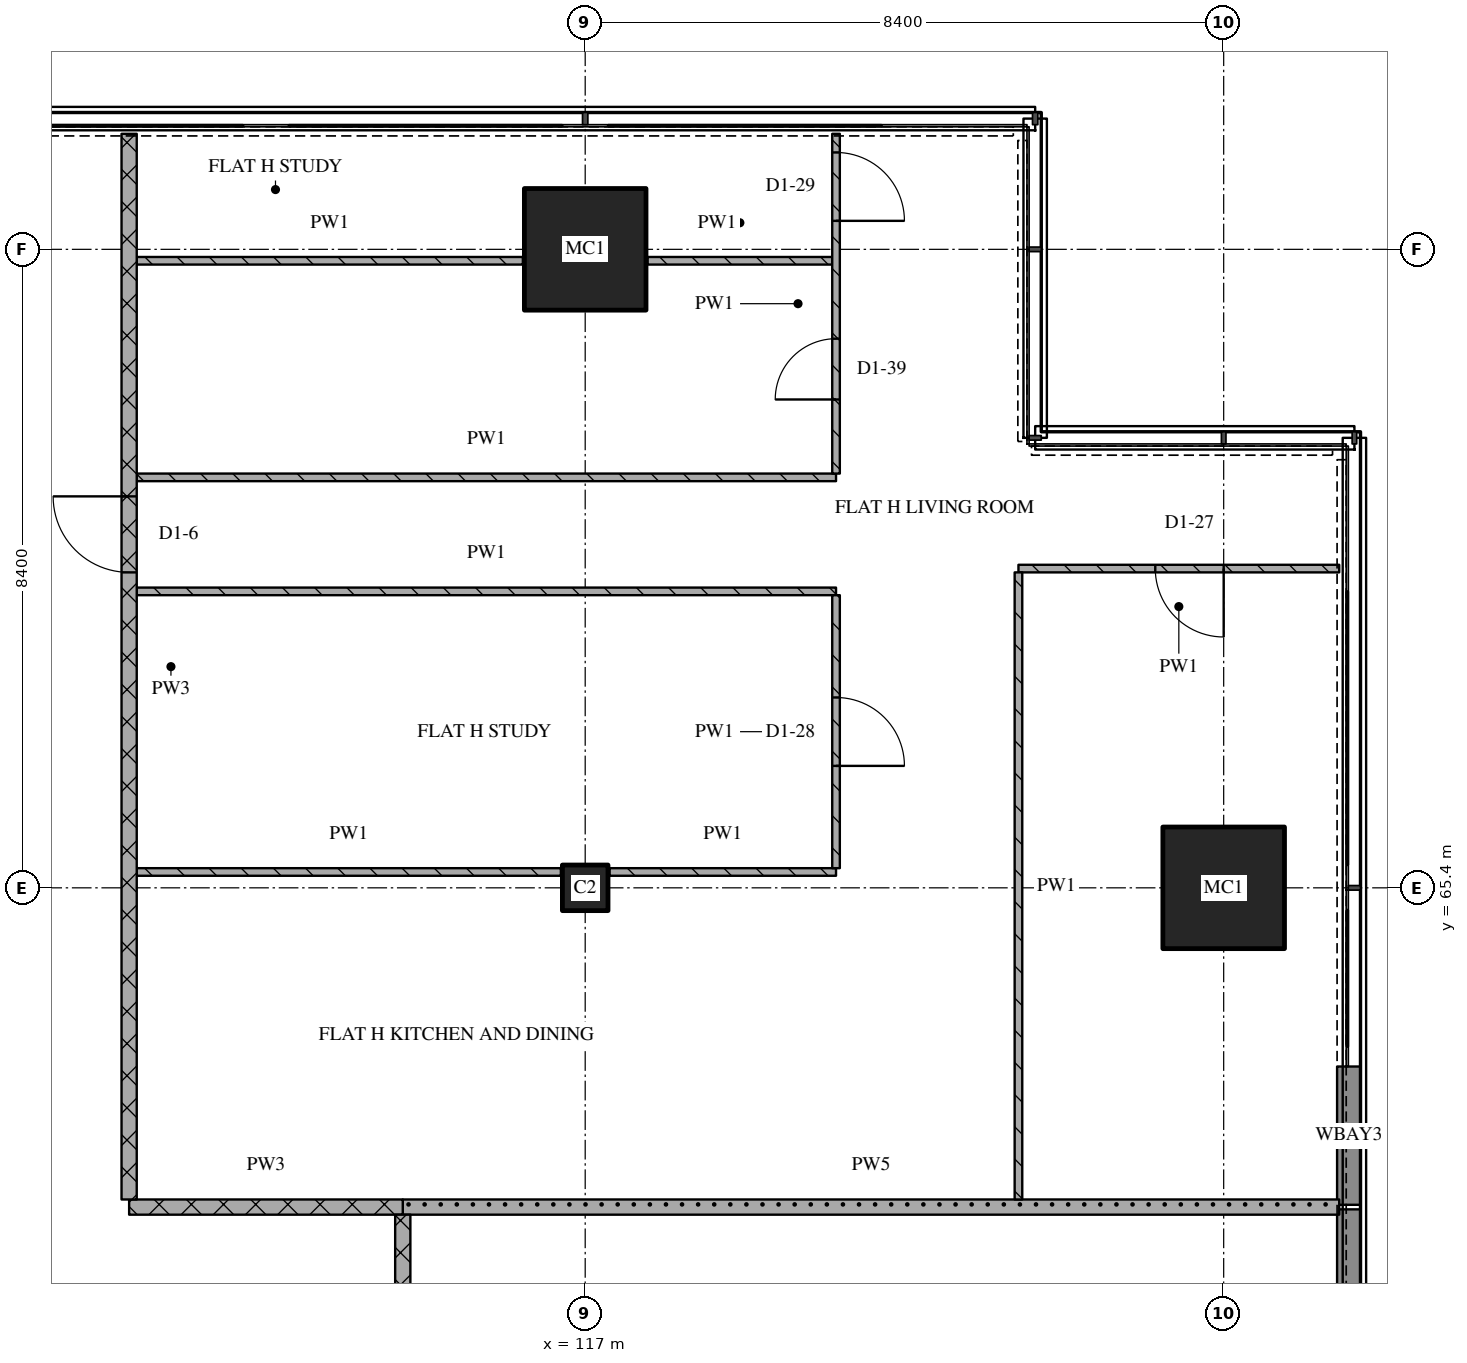
"""IFC4 building model, lengths in metres.
Left out: names, types, materials, properties, quantities, classifications, styles, units other than length and angle.
Written with IfcOpenShell. Run it as: python <this file> out.ifc"""

import sys

from ifc_helpers import new_model, si_unit, direction, frame, frame_2d, origin, origin_2d, place, context, subcontext, project, spatial, rectangle, extrude, element, fill, save


model = new_model("IFC4")
c1 = context("Model", 3, precision=1e-05, world=origin(), true_north=direction((0.0, 1.0)))
c2 = subcontext(c1, "Body", "Model", "MODEL_VIEW")
j1 = project(units=[si_unit("LENGTHUNIT", "METRE"), si_unit("PLANEANGLEUNIT", "RADIAN")], contexts=[c1])
p1 = place(None, origin())
s1 = spatial("IfcSite", under=j1, at=p1, CompositionType="ELEMENT")
p2 = place(p1, origin())
s2 = spatial("IfcBuilding", under=s1, at=p2, CompositionType="ELEMENT")
p3 = place(p2, frame((0.0, 0.0, 205.5)))
s3 = spatial("IfcBuildingStorey", under=s2, at=p3, CompositionType="ELEMENT", Elevation=205.5)
p4 = place(p3, frame((117.0, 65.4, 0.0), z_axis=(0.0, 0.0, 1.0), x_axis=(1.0, 0.0, 0.0)))
e1 = element("IfcColumn", 1, at=p4, inside=s3, PredefinedType="COLUMN", context=c2, shape_type="SweptSolid", body=[
    extrude(rectangle(XDim=0.6, YDim=0.6, at=origin_2d()), origin(), (0.0, 0.0, 1.0), 3.6),
])
for number, where, z_axis, x_axis in (
    (2, (117.0, 73.8, 0.0), (0.0, 0.0, 1.0), (1.0, 0.0, 0.0)),
    (3, (125.4, 65.4, 0.0), (0.0, 0.0, 1.0), (1.0, 0.0, 0.0)),
):
    element("IfcColumn", number, at=place(p3, frame(where, z_axis=z_axis, x_axis=x_axis)), inside=s3, PredefinedType="COLUMN", context=c2, shape_type="SweptSolid", body=[
        extrude(rectangle(XDim=1.6, YDim=1.6, at=origin_2d()), origin(), (0.0, 0.0, 1.0), 3.6),
    ])
p5 = place(p3, frame((127.046, 61.17, 0.0), z_axis=(0.0, 0.0, 1.0), x_axis=(0.0, -1.0, 0.0)))
e4 = element("IfcWall", 4, at=p5, inside=s3, PredefinedType="SOLIDWALL", context=c2, shape_type="SweptSolid", body=[
    extrude(rectangle(XDim=4.14, YDim=0.308, at=frame_2d((2.07, 0.0))), origin(), (0.0, 0.0, 1.0), 3.2),
])
p6 = place(p3, frame((127.046, 63.049, 0.0), z_axis=(0.0, 0.0, 1.0), x_axis=(0.0, -1.0, 0.0)))
e5 = element("IfcWall", 5, at=p6, inside=s3, PredefinedType="SOLIDWALL", context=c2, shape_type="SweptSolid", body=[
    extrude(rectangle(XDim=1.819, YDim=0.308, at=frame_2d((0.91, 0.0))), origin(), (0.0, 0.0, 1.0), 3.2),
])
p7 = place(p3, frame((111.0, 61.2, 0.0), z_axis=(0.0, 0.0, 1.0), x_axis=(1.0, 0.0, 0.0)))
e6 = element("IfcWall", 6, at=p7, inside=s3, PredefinedType="PARTITIONING", context=c2, shape_type="SweptSolid", body=[
    extrude(rectangle(XDim=3.6, YDim=0.2, at=frame_2d((1.8, 0.0))), origin(), (0.0, 0.0, 1.0), 3.32),
])
p8 = place(p3, frame((114.6, 61.2, 0.0), z_axis=(0.0, 0.0, 1.0), x_axis=(1.0, 0.0, 0.0)))
e7 = element("IfcWall", 7, at=p8, inside=s3, PredefinedType="PARTITIONING", context=c2, shape_type="SweptSolid", body=[
    extrude(rectangle(XDim=12.32, YDim=0.2, at=frame_2d((6.16, 0.0))), origin(), (0.0, 0.0, 1.0), 3.32),
])
p9 = place(p3, frame((111.1, 65.609, 0.0), z_axis=(0.0, 0.0, 1.0), x_axis=(1.0, 0.0, 0.0)))
e8 = element("IfcWall", 8, at=p9, inside=s3, PredefinedType="PARTITIONING", context=c2, shape_type="SweptSolid", body=[
    extrude(rectangle(XDim=5.58, YDim=0.1, at=frame_2d((2.79, 0.0))), origin(), (0.0, 0.0, 1.0), 3.32),
])
p10 = place(p3, frame((117.32, 65.609, 0.0), z_axis=(0.0, 0.0, 1.0), x_axis=(1.0, 0.0, 0.0)))
e9 = element("IfcWall", 9, at=p10, inside=s3, PredefinedType="PARTITIONING", context=c2, shape_type="SweptSolid", body=[
    extrude(rectangle(XDim=2.98, YDim=0.1, at=frame_2d((1.49, 0.0))), origin(), (0.0, 0.0, 1.0), 3.32),
])
p11 = place(p3, frame((111.1, 69.3, 0.0), z_axis=(0.0, 0.0, 1.0), x_axis=(1.0, 0.0, 0.0)))
e10 = element("IfcWall", 10, at=p11, inside=s3, PredefinedType="PARTITIONING", context=c2, shape_type="SweptSolid", body=[
    extrude(rectangle(XDim=9.2, YDim=0.1, at=frame_2d((4.6, 0.0))), origin(), (0.0, 0.0, 1.0), 3.32),
])
p12 = place(p3, frame((126.92, 69.6, 0.0), z_axis=(0.0, 0.0, 1.0), x_axis=(-1.0, 0.0, 0.0)))
e11 = element("IfcWall", 11, at=p12, inside=s3, PredefinedType="PARTITIONING", context=c2, shape_type="SweptSolid", body=[
    extrude(rectangle(XDim=4.22, YDim=0.1, at=frame_2d((2.11, 0.0))), origin(), (0.0, 0.0, 1.0), 3.32),
])
p13 = place(p12, frame((1.52, 0.0, 0.0)))
e12 = element("IfcOpeningElement", 12, at=p13, cuts=e11, PredefinedType="OPENING", context=c2, shape_type="SweptSolid", body=[
    extrude(rectangle(XDim=0.9, YDim=2.1, at=frame_2d((0.45, 1.05))), frame((0.0, 0.06, 0.0), z_axis=(0.0, -1.0, 0.0), x_axis=(1.0, 0.0, 0.0)), (0.0, 0.0, 1.0), 0.12),
])
p14 = place(p3, frame((111.1, 70.8, 0.0), z_axis=(0.0, 0.0, 1.0), x_axis=(1.0, 0.0, 0.0)))
e13 = element("IfcWall", 13, at=p14, inside=s3, PredefinedType="PARTITIONING", context=c2, shape_type="SweptSolid", body=[
    extrude(rectangle(XDim=9.2, YDim=0.1, at=frame_2d((4.6, 0.0))), origin(), (0.0, 0.0, 1.0), 3.32),
])
p15 = place(p3, frame((111.1, 73.649, 0.0), z_axis=(0.0, 0.0, 1.0), x_axis=(1.0, 0.0, 0.0)))
e14 = element("IfcWall", 14, at=p15, inside=s3, PredefinedType="PARTITIONING", context=c2, shape_type="SweptSolid", body=[
    extrude(rectangle(XDim=5.08, YDim=0.1, at=frame_2d((2.54, 0.0))), origin(), (0.0, 0.0, 1.0), 3.32),
])
p16 = place(p3, frame((117.82, 73.649, 0.0), z_axis=(0.0, 0.0, 1.0), x_axis=(1.0, 0.0, 0.0)))
e15 = element("IfcWall", 15, at=p16, inside=s3, PredefinedType="PARTITIONING", context=c2, shape_type="SweptSolid", body=[
    extrude(rectangle(XDim=2.43, YDim=0.1, at=frame_2d((1.215, 0.0))), origin(), (0.0, 0.0, 1.0), 3.32),
])
p17 = place(p3, frame((111.0, 75.32, 0.0), z_axis=(0.0, 0.0, 1.0), x_axis=(0.0, -1.0, 0.0)))
e16 = element("IfcWall", 16, at=p17, inside=s3, PredefinedType="PARTITIONING", context=c2, shape_type="SweptSolid", body=[
    extrude(rectangle(XDim=14.02, YDim=0.2, at=frame_2d((7.01, 0.0))), origin(), (0.0, 0.0, 1.0), 3.32),
])
p18 = place(p17, frame((4.77, 0.0, 0.0)))
e17 = element("IfcOpeningElement", 17, at=p18, cuts=e16, PredefinedType="OPENING", context=c2, shape_type="SweptSolid", body=[
    extrude(rectangle(XDim=1.0, YDim=2.1, at=frame_2d((0.5, 1.05))), frame((0.0, 0.11, 0.0), z_axis=(0.0, -1.0, 0.0), x_axis=(1.0, 0.0, 0.0)), (0.0, 0.0, 1.0), 0.22),
])
p19 = place(p3, frame((114.6, 61.1, 0.0), z_axis=(0.0, 0.0, 1.0), x_axis=(0.0, -1.0, 0.0)))
e18 = element("IfcWall", 18, at=p19, inside=s3, PredefinedType="PARTITIONING", context=c2, shape_type="SweptSolid", body=[
    extrude(rectangle(XDim=17.8, YDim=0.2, at=frame_2d((8.9, 0.0))), origin(), (0.0, 0.0, 1.0), 3.32),
])
p20 = place(p19, frame((0.95, 0.0, 0.0)))
e19 = element("IfcOpeningElement", 19, at=p20, cuts=e18, PredefinedType="OPENING", context=c2, shape_type="SweptSolid", body=[
    extrude(rectangle(XDim=1.2, YDim=2.1, at=frame_2d((0.6, 1.05))), frame((0.0, 0.11, 0.0), z_axis=(0.0, -1.0, 0.0), x_axis=(1.0, 0.0, 0.0)), (0.0, 0.0, 1.0), 0.22),
])
p21 = place(p3, frame((120.3, 65.659, 0.0), z_axis=(0.0, 0.0, 1.0), x_axis=(0.0, 1.0, 0.0)))
e20 = element("IfcWall", 20, at=p21, inside=s3, PredefinedType="PARTITIONING", context=c2, shape_type="SweptSolid", body=[
    extrude(rectangle(XDim=3.591, YDim=0.1, at=frame_2d((1.796, 0.0))), origin(), (0.0, 0.0, 1.0), 3.32),
])
p22 = place(p21, frame((1.346, 0.0, 0.0)))
e21 = element("IfcOpeningElement", 21, at=p22, cuts=e20, PredefinedType="OPENING", context=c2, shape_type="SweptSolid", body=[
    extrude(rectangle(XDim=0.9, YDim=2.1, at=frame_2d((0.45, 1.05))), frame((0.0, 0.06, 0.0), z_axis=(0.0, -1.0, 0.0), x_axis=(1.0, 0.0, 0.0)), (0.0, 0.0, 1.0), 0.12),
])
p23 = place(p3, frame((120.3, 70.85, 0.0), z_axis=(0.0, 0.0, 1.0), x_axis=(0.0, 1.0, 0.0)))
e22 = element("IfcWall", 22, at=p23, inside=s3, PredefinedType="PARTITIONING", context=c2, shape_type="SweptSolid", body=[
    extrude(rectangle(XDim=4.47, YDim=0.1, at=frame_2d((2.235, 0.0))), origin(), (0.0, 0.0, 1.0), 3.32),
])
p24 = place(p23, frame((0.975, 0.0, 0.0)))
e23 = element("IfcOpeningElement", 23, at=p24, cuts=e22, PredefinedType="OPENING", context=c2, shape_type="SweptSolid", body=[
    extrude(rectangle(XDim=0.8, YDim=2.1, at=frame_2d((0.4, 1.05))), frame((0.0, 0.06, 0.0), z_axis=(0.0, -1.0, 0.0), x_axis=(1.0, 0.0, 0.0)), (0.0, 0.0, 1.0), 0.12),
])
p25 = place(p23, frame((3.325, 0.0, 0.0)))
e24 = element("IfcOpeningElement", 24, at=p25, cuts=e22, PredefinedType="OPENING", context=c2, shape_type="SweptSolid", body=[
    extrude(rectangle(XDim=0.9, YDim=2.1, at=frame_2d((0.45, 1.05))), frame((0.0, 0.06, 0.0), z_axis=(0.0, -1.0, 0.0), x_axis=(1.0, 0.0, 0.0)), (0.0, 0.0, 1.0), 0.12),
])
p26 = place(p3, frame((122.7, 69.55, 0.0), z_axis=(0.0, 0.0, 1.0), x_axis=(0.0, -1.0, 0.0)))
e25 = element("IfcWall", 25, at=p26, inside=s3, PredefinedType="PARTITIONING", context=c2, shape_type="SweptSolid", body=[
    extrude(rectangle(XDim=8.25, YDim=0.1, at=frame_2d((4.125, 0.0))), origin(), (0.0, 0.0, 1.0), 3.32),
])
p27 = place(p13, origin())
e26 = element("IfcDoor", 26, at=p27, inside=s3, OperationType="SINGLE_SWING_LEFT", PredefinedType="DOOR", context=c2, shape_type="SweptSolid", body=[
    extrude(rectangle(XDim=0.9, YDim=2.1, at=frame_2d((0.45, 1.05))), frame((0.0, 0.025, 0.0), z_axis=(0.0, -1.0, 0.0), x_axis=(1.0, 0.0, 0.0)), (0.0, 0.0, 1.0), 0.05),
])
fill(e12, e26)
p28 = place(p18, origin())
e27 = element("IfcDoor", 27, at=p28, inside=s3, OperationType="SINGLE_SWING_RIGHT", PredefinedType="DOOR", context=c2, shape_type="SweptSolid", body=[
    extrude(rectangle(XDim=1.0, YDim=2.1, at=frame_2d((0.5, 1.05))), frame((0.0, 0.025, 0.0), z_axis=(0.0, -1.0, 0.0), x_axis=(1.0, 0.0, 0.0)), (0.0, 0.0, 1.0), 0.05),
])
fill(e17, e27)
p29 = place(p22, origin())
e28 = element("IfcDoor", 28, at=p29, inside=s3, OperationType="SINGLE_SWING_RIGHT", PredefinedType="DOOR", context=c2, shape_type="SweptSolid", body=[
    extrude(rectangle(XDim=0.9, YDim=2.1, at=frame_2d((0.45, 1.05))), frame((0.0, 0.025, 0.0), z_axis=(0.0, -1.0, 0.0), x_axis=(1.0, 0.0, 0.0)), (0.0, 0.0, 1.0), 0.05),
])
fill(e21, e28)
p30 = place(p24, origin())
e29 = element("IfcDoor", 29, at=p30, inside=s3, OperationType="SINGLE_SWING_LEFT", PredefinedType="DOOR", context=c2, shape_type="SweptSolid", body=[
    extrude(rectangle(XDim=0.8, YDim=2.1, at=frame_2d((0.4, 1.05))), frame((0.0, 0.025, 0.0), z_axis=(0.0, -1.0, 0.0), x_axis=(1.0, 0.0, 0.0)), (0.0, 0.0, 1.0), 0.05),
])
fill(e23, e29)
p31 = place(p25, origin())
e30 = element("IfcDoor", 30, at=p31, inside=s3, OperationType="SINGLE_SWING_RIGHT", PredefinedType="DOOR", context=c2, shape_type="SweptSolid", body=[
    extrude(rectangle(XDim=0.9, YDim=2.1, at=frame_2d((0.45, 1.05))), frame((0.0, 0.025, 0.0), z_axis=(0.0, -1.0, 0.0), x_axis=(1.0, 0.0, 0.0)), (0.0, 0.0, 1.0), 0.05),
])
fill(e24, e30)
save(model, sys.argv[1])
